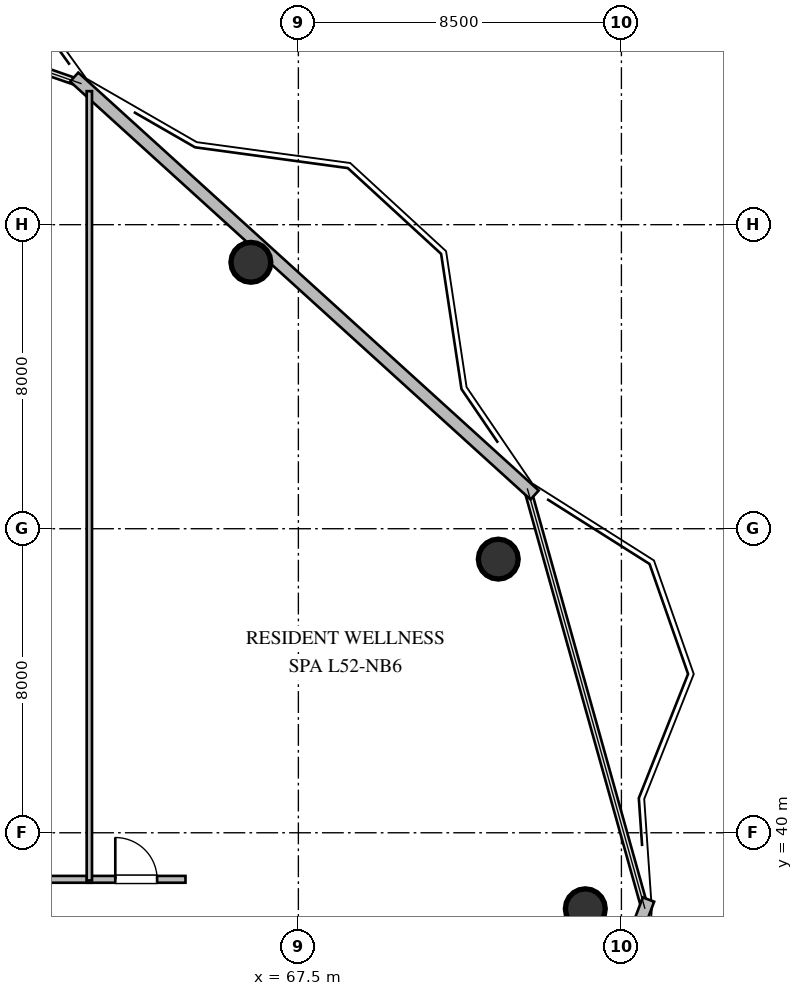
"""IFC4 building model, lengths in metres.
Left out: names, types, materials, properties, quantities, classifications, styles, units other than length and angle.
Written with IfcOpenShell. Run it as: python <this file> out.ifc"""

import sys

from ifc_helpers import new_model, si_unit, direction, frame, frame_2d, origin, origin_2d, place, context, subcontext, project, spatial, rectangle, circle, extrude, element, fill, save


model = new_model("IFC4")
c1 = context("Model", 3, precision=1e-05, world=origin(), true_north=direction((0.0, 1.0)))
c2 = subcontext(c1, "Body", "Model", "MODEL_VIEW")
j1 = project(units=[si_unit("LENGTHUNIT", "METRE"), si_unit("PLANEANGLEUNIT", "RADIAN")], contexts=[c1])
p1 = place(None, origin())
s1 = spatial("IfcSite", under=j1, at=p1, CompositionType="ELEMENT")
p2 = place(p1, origin())
s2 = spatial("IfcBuilding", under=s1, at=p2, CompositionType="ELEMENT")
p3 = place(p2, frame((0.0, 0.0, 199.2)))
s3 = spatial("IfcBuildingStorey", under=s2, at=p3, CompositionType="ELEMENT", Elevation=199.2)
for number, where, z_axis, x_axis in (
    (1, (75.05, 38.0, 0.0), (0.0, 0.0, 1.0), (1.0, 0.0, 0.0)),
    (2, (72.76, 47.2, 0.0), (0.0, 0.0, 1.0), (1.0, 0.0, 0.0)),
    (3, (66.25, 55.01, 0.0), (0.0, 0.0, 1.0), (1.0, 0.0, 0.0)),
):
    element("IfcColumn", number, at=place(p3, frame(where, z_axis=z_axis, x_axis=x_axis)), inside=s3, PredefinedType="COLUMN", context=c2, shape_type="SweptSolid", body=[
        extrude(circle(Radius=0.525, at=origin_2d()), origin(), (0.0, 0.0, 1.0), 3.6),
    ])
p4 = place(p3, frame((76.712, 38.243, 0.0), z_axis=(0.0, 0.0, 1.0), x_axis=(-0.353659523244, -0.935374225441, 0.0)))
e4 = element("IfcWall", 4, at=p4, inside=s3, PredefinedType="STANDARD", context=c2, shape_type="SweptSolid", body=[
    extrude(rectangle(XDim=14.172, YDim=0.32, at=frame_2d((7.086, 0.0))), origin(), (0.0, 0.0, 1.0), 3.36),
])
p5 = place(p3, frame((61.602, 59.884, 0.0), z_axis=(0.0, 0.0, 1.0), x_axis=(0.740416582554, -0.672148260638, 0.0)))
e5 = element("IfcWall", 5, at=p5, inside=s3, PredefinedType="STANDARD", context=c2, shape_type="SweptSolid", body=[
    extrude(rectangle(XDim=16.361, YDim=0.32, at=frame_2d((8.181, 0.0))), origin(), (0.0, 0.0, 1.0), 3.36),
])
p6 = place(p3, frame((56.935, 38.775, 0.0), z_axis=(0.0, 0.0, 1.0), x_axis=(1.0, 0.0, 0.0)))
e6 = element("IfcWall", 6, at=p6, inside=s3, PredefinedType="PARTITIONING", context=c2, shape_type="SweptSolid", body=[
    extrude(rectangle(XDim=5.13, YDim=0.18, at=frame_2d((2.565, 0.0))), origin(), (0.0, 0.0, 1.0), 3.36),
])
p7 = place(p6, frame((2.015, 0.0, 0.0)))
e7 = element("IfcOpeningElement", 7, at=p7, cuts=e6, PredefinedType="OPENING", context=c2, shape_type="SweptSolid", body=[
    extrude(rectangle(XDim=1.1, YDim=2.1, at=frame_2d((0.55, 1.05))), frame((0.0, 0.1, 0.0), z_axis=(0.0, -1.0, 0.0), x_axis=(1.0, 0.0, 0.0)), (0.0, 0.0, 1.0), 0.2),
])
p8 = place(p3, frame((61.935, 38.775, 0.0), z_axis=(0.0, 0.0, 1.0), x_axis=(1.0, 0.0, 0.0)))
e8 = element("IfcWall", 8, at=p8, inside=s3, PredefinedType="PARTITIONING", context=c2, shape_type="SweptSolid", body=[
    extrude(rectangle(XDim=2.595, YDim=0.18, at=frame_2d((1.297, 0.0))), origin(), (0.0, 0.0, 1.0), 3.36),
])
p9 = place(p8, frame((0.748, 0.0, 0.0)))
e9 = element("IfcOpeningElement", 9, at=p9, cuts=e8, PredefinedType="OPENING", context=c2, shape_type="SweptSolid", body=[
    extrude(rectangle(XDim=1.1, YDim=2.1, at=frame_2d((0.55, 1.05))), frame((0.0, 0.1, 0.0), z_axis=(0.0, -1.0, 0.0), x_axis=(1.0, 0.0, 0.0)), (0.0, 0.0, 1.0), 0.2),
])
p10 = place(p3, frame((62.0, 59.513, 0.0), z_axis=(0.0, 0.0, 1.0), x_axis=(0.0, -1.0, 0.0)))
e10 = element("IfcWall", 10, at=p10, inside=s3, PredefinedType="PARTITIONING", context=c2, shape_type="SweptSolid", body=[
    extrude(rectangle(XDim=20.768, YDim=0.14, at=frame_2d((10.384, 0.0))), origin(), (0.0, 0.0, 1.0), 3.36),
])
p11 = place(p9, origin())
e11 = element("IfcDoor", 11, at=p11, inside=s3, OperationType="SINGLE_SWING_LEFT", PredefinedType="DOOR", context=c2, shape_type="SweptSolid", body=[
    extrude(rectangle(XDim=1.1, YDim=2.1, at=frame_2d((0.55, 1.05))), frame((0.0, 0.025, 0.0), z_axis=(0.0, -1.0, 0.0), x_axis=(1.0, 0.0, 0.0)), (0.0, 0.0, 1.0), 0.05),
])
fill(e9, e11)
save(model, sys.argv[1])
